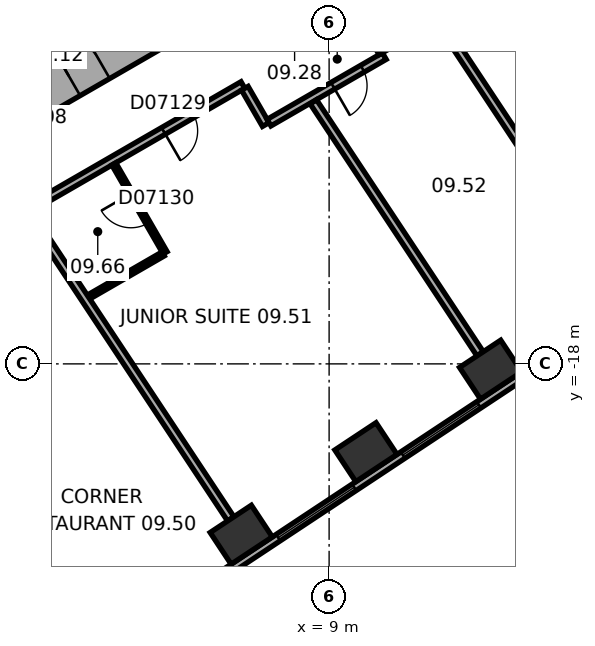
"""IFC4 building model, lengths in metres.
Left out: names, types, materials, properties, quantities, classifications, styles, units other than length and angle.
Written with IfcOpenShell. Run it as: python <this file> out.ifc"""

import sys

from ifc_helpers import new_model, si_unit, direction, frame, frame_2d, origin, origin_2d, place, context, subcontext, project, spatial, rectangle, extrude, element, fill, save


model = new_model("IFC4")
c1 = context("Model", 3, precision=1e-05, world=origin(), true_north=direction((0.0, 1.0)))
c2 = subcontext(c1, "Body", "Model", "MODEL_VIEW")
j1 = project(units=[si_unit("LENGTHUNIT", "METRE"), si_unit("PLANEANGLEUNIT", "RADIAN")], contexts=[c1])
p1 = place(None, origin())
s1 = spatial("IfcSite", under=j1, at=p1, CompositionType="ELEMENT")
p2 = place(p1, origin())
s2 = spatial("IfcBuilding", under=s1, at=p2, CompositionType="ELEMENT")
p3 = place(p2, frame((0.0, 0.0, 50.6)))
s3 = spatial("IfcBuildingStorey", under=s2, at=p3, CompositionType="ELEMENT", Elevation=50.6)
for number, where, z_axis, x_axis in (
    (1, (6.688, -22.496, 0.0), (0.0, 0.0, 1.0), (0.834, 0.552, 0.0)),
    (2, (9.969, -20.324, 0.0), (0.0, 0.0, 1.0), (0.834, 0.552, 0.0)),
    (3, (13.25, -18.152, 0.0), (0.0, 0.0, 1.0), (0.834, 0.552, 0.0)),
):
    element("IfcColumn", number, at=place(p3, frame(where, z_axis=z_axis, x_axis=x_axis)), inside=s3, PredefinedType="COLUMN", context=c2, shape_type="SweptSolid", body=[
        extrude(rectangle(XDim=1.3, YDim=1.0, at=origin_2d()), origin(), (0.0, 0.0, 1.0), 3.3),
    ])
p4 = place(p3, frame((-0.3, -11.836, 0.0), z_axis=(0.0, 0.0, 1.0), x_axis=(0.866021384402, 0.500006961711, 0.0)))
e4 = element("IfcWall", 4, at=p4, inside=s3, PredefinedType="SHEAR", context=c2, shape_type="SweptSolid", body=[
    extrude(rectangle(XDim=12.355, YDim=1.2, at=frame_2d((6.178, 0.0))), origin(), (0.0, 0.0, 1.0), 3.3),
])
p5 = place(p4, frame((2.828, 0.0, 0.0)))
e5 = element("IfcOpeningElement", 5, at=p5, cuts=e4, PredefinedType="OPENING", context=c2, shape_type="SweptSolid", body=[
    extrude(rectangle(XDim=0.9, YDim=2.1, at=frame_2d((0.45, 1.05))), frame((0.0, 0.61, 0.0), z_axis=(0.0, -1.0, 0.0), x_axis=(1.0, 0.0, 0.0)), (0.0, 0.0, 1.0), 1.22),
])
p6 = place(p4, frame((5.428, 0.0, 0.0)))
e6 = element("IfcOpeningElement", 6, at=p6, cuts=e4, PredefinedType="OPENING", context=c2, shape_type="SweptSolid", body=[
    extrude(rectangle(XDim=0.9, YDim=2.1, at=frame_2d((0.45, 1.05))), frame((0.0, 0.61, 0.0), z_axis=(0.0, -1.0, 0.0), x_axis=(1.0, 0.0, 0.0)), (0.0, 0.0, 1.0), 1.22),
])
p7 = place(p4, frame((7.928, 0.0, 0.0)))
e7 = element("IfcOpeningElement", 7, at=p7, cuts=e4, PredefinedType="OPENING", context=c2, shape_type="SweptSolid", body=[
    extrude(rectangle(XDim=1.1, YDim=2.1, at=frame_2d((0.55, 1.05))), frame((0.0, 0.61, 0.0), z_axis=(0.0, -1.0, 0.0), x_axis=(1.0, 0.0, 0.0)), (0.0, 0.0, 1.0), 1.22),
])
p8 = place(p3, frame((3.083, -25.601, 0.0), z_axis=(0.0, 0.0, 1.0), x_axis=(0.833884295743, 0.551939291329, 0.0)))
e8 = element("IfcWall", 8, at=p8, inside=s3, PredefinedType="STANDARD", context=c2, shape_type="SweptSolid", body=[
    extrude(rectangle(XDim=21.246, YDim=0.2, at=frame_2d((10.623, 0.0))), origin(), (0.0, 0.0, 1.0), 3.3),
])
p9 = place(p8, frame((1.553, 0.0, 0.8)))
e9 = element("IfcOpeningElement", 9, at=p9, cuts=e8, PredefinedType="OPENING", context=c2, shape_type="SweptSolid", body=[
    extrude(rectangle(XDim=2.4, YDim=1.7, at=frame_2d((1.2, 0.85))), frame((0.0, 0.11, 0.0), z_axis=(0.0, -1.0, 0.0), x_axis=(1.0, 0.0, 0.0)), (0.0, 0.0, 1.0), 0.22),
])
p10 = place(p8, frame((5.488, 0.0, 0.8)))
e10 = element("IfcOpeningElement", 10, at=p10, cuts=e8, PredefinedType="OPENING", context=c2, shape_type="SweptSolid", body=[
    extrude(rectangle(XDim=2.4, YDim=1.7, at=frame_2d((1.2, 0.85))), frame((0.0, 0.11, 0.0), z_axis=(0.0, -1.0, 0.0), x_axis=(1.0, 0.0, 0.0)), (0.0, 0.0, 1.0), 0.22),
])
p11 = place(p8, frame((9.422, 0.0, 0.8)))
e11 = element("IfcOpeningElement", 11, at=p11, cuts=e8, PredefinedType="OPENING", context=c2, shape_type="SweptSolid", body=[
    extrude(rectangle(XDim=2.4, YDim=1.7, at=frame_2d((1.2, 0.85))), frame((0.0, 0.11, 0.0), z_axis=(0.0, -1.0, 0.0), x_axis=(1.0, 0.0, 0.0)), (0.0, 0.0, 1.0), 0.22),
])
p12 = place(p8, frame((13.357, 0.0, 0.8)))
e12 = element("IfcOpeningElement", 12, at=p12, cuts=e8, PredefinedType="OPENING", context=c2, shape_type="SweptSolid", body=[
    extrude(rectangle(XDim=2.4, YDim=1.7, at=frame_2d((1.2, 0.85))), frame((0.0, 0.11, 0.0), z_axis=(0.0, -1.0, 0.0), x_axis=(1.0, 0.0, 0.0)), (0.0, 0.0, 1.0), 0.22),
])
p13 = place(p8, frame((17.291, 0.0, 0.8)))
e13 = element("IfcOpeningElement", 13, at=p13, cuts=e8, PredefinedType="OPENING", context=c2, shape_type="SweptSolid", body=[
    extrude(rectangle(XDim=2.4, YDim=1.7, at=frame_2d((1.2, 0.85))), frame((0.0, 0.11, 0.0), z_axis=(0.0, -1.0, 0.0), x_axis=(1.0, 0.0, 0.0)), (0.0, 0.0, 1.0), 0.22),
])
p14 = place(p3, frame((1.033, -13.953, 0.0), z_axis=(0.0, 0.0, 1.0), x_axis=(0.866017531406, 0.500013635111, 0.0)))
e14 = element("IfcWall", 14, at=p14, inside=s3, PredefinedType="PARTITIONING", context=c2, shape_type="SweptSolid", body=[
    extrude(rectangle(XDim=6.58, YDim=0.2, at=frame_2d((3.29, 0.0))), origin(), (0.0, 0.0, 1.0), 3.05),
])
p15 = place(p14, frame((4.165, 0.0, 0.0)))
e15 = element("IfcOpeningElement", 15, at=p15, cuts=e14, PredefinedType="OPENING", context=c2, shape_type="SweptSolid", body=[
    extrude(rectangle(XDim=0.9, YDim=2.1, at=frame_2d((0.45, 1.05))), frame((0.0, 0.11, 0.0), z_axis=(0.0, -1.0, 0.0), x_axis=(1.0, 0.0, 0.0)), (0.0, 0.0, 1.0), 0.22),
])
p16 = place(p3, frame((3.335, -12.739, 0.0), z_axis=(0.0, 0.0, 1.0), x_axis=(0.499980770555, -0.866036505625, 0.0)))
e16 = element("IfcWall", 16, at=p16, inside=s3, PredefinedType="PARTITIONING", context=c2, shape_type="SweptSolid", body=[
    extrude(rectangle(XDim=2.7, YDim=0.12, at=frame_2d((1.35, 0.0))), origin(), (0.0, 0.0, 1.0), 3.05),
])
p17 = place(p16, frame((0.9, 0.0, 0.0)))
e17 = element("IfcOpeningElement", 17, at=p17, cuts=e16, PredefinedType="OPENING", context=c2, shape_type="SweptSolid", body=[
    extrude(rectangle(XDim=0.9, YDim=2.1, at=frame_2d((0.45, 1.05))), frame((0.0, 0.07, 0.0), z_axis=(0.0, -1.0, 0.0), x_axis=(1.0, 0.0, 0.0)), (0.0, 0.0, 1.0), 0.14),
])
p18 = place(p3, frame((4.633, -15.107, 0.0), z_axis=(0.0, 0.0, 1.0), x_axis=(-0.866022496617, -0.500005035328, 0.0)))
e18 = element("IfcWall", 18, at=p18, inside=s3, PredefinedType="PARTITIONING", context=c2, shape_type="SweptSolid", body=[
    extrude(rectangle(XDim=2.269, YDim=0.12, at=frame_2d((1.134, 0.0))), origin(), (0.0, 0.0, 1.0), 3.05),
])
p19 = place(p3, frame((6.412, -22.079, 0.0), z_axis=(0.0, 0.0, 1.0), x_axis=(-0.551919507115, 0.83389739037, 0.0)))
e19 = element("IfcWall", 19, at=p19, inside=s3, PredefinedType="PARTITIONING", context=c2, shape_type="SweptSolid", body=[
    extrude(rectangle(XDim=9.635, YDim=0.2, at=frame_2d((4.817, 0.0))), origin(), (0.0, 0.0, 1.0), 3.05),
])
p20 = place(p3, frame((6.782, -10.749, 0.0), z_axis=(0.0, 0.0, 1.0), x_axis=(0.500074377092, -0.865982457891, 0.0)))
e20 = element("IfcWall", 20, at=p20, inside=s3, PredefinedType="PARTITIONING", context=c2, shape_type="SweptSolid", body=[
    extrude(rectangle(XDim=1.101, YDim=0.2, at=frame_2d((0.55, 0.0))), origin(), (0.0, 0.0, 1.0), 3.05),
])
p21 = place(p3, frame((7.419, -11.653, 0.0), z_axis=(0.0, 0.0, 1.0), x_axis=(0.866038154057, 0.49997791523, 0.0)))
e21 = element("IfcWall", 21, at=p21, inside=s3, PredefinedType="PARTITIONING", context=c2, shape_type="SweptSolid", body=[
    extrude(rectangle(XDim=3.502, YDim=0.2, at=frame_2d((1.751, 0.0))), origin(), (0.0, 0.0, 1.0), 3.05),
])
p22 = place(p21, frame((1.94, 0.0, 0.0)))
e22 = element("IfcOpeningElement", 22, at=p22, cuts=e21, PredefinedType="OPENING", context=c2, shape_type="SweptSolid", body=[
    extrude(rectangle(XDim=0.9, YDim=2.1, at=frame_2d((0.45, 1.05))), frame((0.0, 0.11, 0.0), z_axis=(0.0, -1.0, 0.0), x_axis=(1.0, 0.0, 0.0)), (0.0, 0.0, 1.0), 0.22),
])
p23 = place(p3, frame((10.402, -9.815, 0.0), z_axis=(0.0, 0.0, 1.0), x_axis=(-0.499968756647, 0.866043441391, 0.0)))
e23 = element("IfcWall", 23, at=p23, inside=s3, PredefinedType="PARTITIONING", context=c2, shape_type="SweptSolid", body=[
    extrude(rectangle(XDim=1.001, YDim=0.2, at=frame_2d((0.5, 0.0))), origin(), (0.0, 0.0, 1.0), 3.05),
])
p24 = place(p3, frame((12.974, -17.735, 0.0), z_axis=(0.0, 0.0, 1.0), x_axis=(-0.55192625685, 0.833892922982, 0.0)))
e24 = element("IfcWall", 24, at=p24, inside=s3, PredefinedType="PARTITIONING", context=c2, shape_type="SweptSolid", body=[
    extrude(rectangle(XDim=7.95, YDim=0.2, at=frame_2d((3.975, 0.0))), origin(), (0.0, 0.0, 1.0), 3.05),
])
p25 = place(p3, frame((16.255, -15.564, 0.0), z_axis=(0.0, 0.0, 1.0), x_axis=(-0.55192208744, 0.833895682562, 0.0)))
e25 = element("IfcWall", 25, at=p25, inside=s3, PredefinedType="PARTITIONING", context=c2, shape_type="SweptSolid", body=[
    extrude(rectangle(XDim=8.913, YDim=0.2, at=frame_2d((4.457, 0.0))), origin(), (0.0, 0.0, 1.0), 2.6),
])
p26 = place(p10, origin())
e26 = element("IfcWindow", 26, at=p26, inside=s3, PartitioningType="SINGLE_PANEL", PredefinedType="WINDOW", context=c2, shape_type="SweptSolid", body=[
    extrude(rectangle(XDim=2.4, YDim=1.7, at=frame_2d((1.2, 0.85))), frame((0.0, 0.03, 0.0), z_axis=(0.0, -1.0, 0.0), x_axis=(1.0, 0.0, 0.0)), (0.0, 0.0, 1.0), 0.06),
])
fill(e10, e26)
p27 = place(p11, origin())
e27 = element("IfcWindow", 27, at=p27, inside=s3, PartitioningType="SINGLE_PANEL", PredefinedType="WINDOW", context=c2, shape_type="SweptSolid", body=[
    extrude(rectangle(XDim=2.4, YDim=1.7, at=frame_2d((1.2, 0.85))), frame((0.0, 0.03, 0.0), z_axis=(0.0, -1.0, 0.0), x_axis=(1.0, 0.0, 0.0)), (0.0, 0.0, 1.0), 0.06),
])
fill(e11, e27)
p28 = place(p5, origin())
e28 = element("IfcDoor", 28, at=p28, inside=s3, OperationType="SINGLE_SWING_LEFT", PredefinedType="DOOR", context=c2, shape_type="SweptSolid", body=[
    extrude(rectangle(XDim=0.9, YDim=2.1, at=frame_2d((0.45, 1.05))), frame((0.0, 0.025, 0.0), z_axis=(0.0, -1.0, 0.0), x_axis=(1.0, 0.0, 0.0)), (0.0, 0.0, 1.0), 0.05),
])
fill(e5, e28)
p29 = place(p15, origin())
e29 = element("IfcDoor", 29, at=p29, inside=s3, OperationType="SINGLE_SWING_LEFT", PredefinedType="DOOR", context=c2, shape_type="SweptSolid", body=[
    extrude(rectangle(XDim=0.9, YDim=2.1, at=frame_2d((0.45, 1.05))), frame((0.0, 0.025, 0.0), z_axis=(0.0, -1.0, 0.0), x_axis=(1.0, 0.0, 0.0)), (0.0, 0.0, 1.0), 0.05),
])
fill(e15, e29)
p30 = place(p17, origin())
e30 = element("IfcDoor", 30, at=p30, inside=s3, OperationType="SINGLE_SWING_LEFT", PredefinedType="DOOR", context=c2, shape_type="SweptSolid", body=[
    extrude(rectangle(XDim=0.9, YDim=2.1, at=frame_2d((0.45, 1.05))), frame((0.0, 0.025, 0.0), z_axis=(0.0, -1.0, 0.0), x_axis=(1.0, 0.0, 0.0)), (0.0, 0.0, 1.0), 0.05),
])
fill(e17, e30)
p31 = place(p22, origin())
e31 = element("IfcDoor", 31, at=p31, inside=s3, OperationType="SINGLE_SWING_LEFT", PredefinedType="DOOR", context=c2, shape_type="SweptSolid", body=[
    extrude(rectangle(XDim=0.9, YDim=2.1, at=frame_2d((0.45, 1.05))), frame((0.0, 0.025, 0.0), z_axis=(0.0, -1.0, 0.0), x_axis=(1.0, 0.0, 0.0)), (0.0, 0.0, 1.0), 0.05),
])
fill(e22, e31)
save(model, sys.argv[1])
